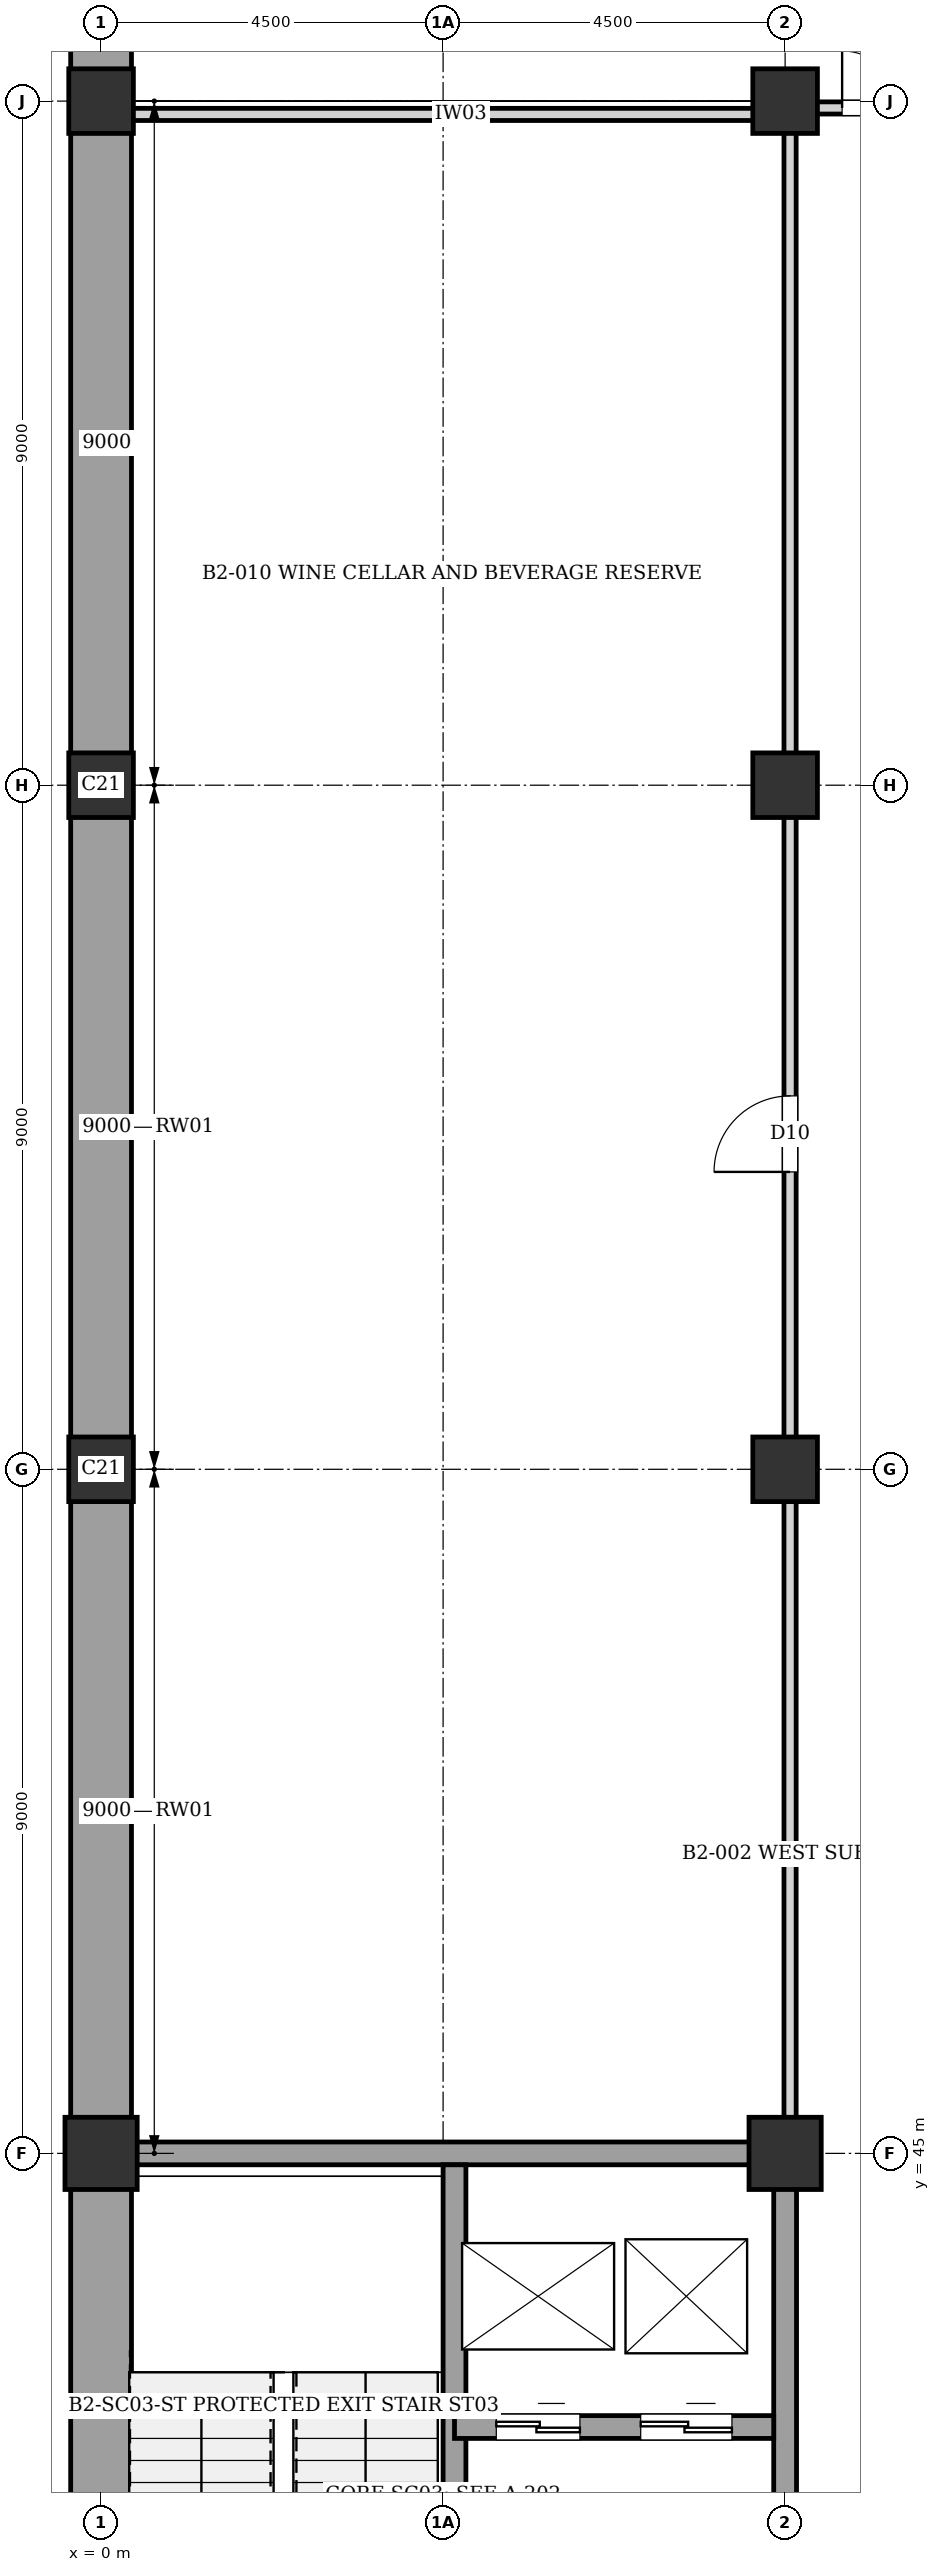
"""IFC4 building model, lengths in metres.
Left out: names, types, materials, properties, quantities, classifications, styles, units other than length and angle.
Written with IfcOpenShell. Run it as: python <this file> out.ifc"""

import sys

from ifc_helpers import new_model, si_unit, direction, frame, frame_2d, origin, origin_2d, place, context, subcontext, project, spatial, rectangle, extrude, element, fill, save


model = new_model("IFC4")
c1 = context("Model", 3, precision=1e-05, world=origin(), true_north=direction((0.0, 1.0)))
c2 = subcontext(c1, "Body", "Model", "MODEL_VIEW")
j1 = project(units=[si_unit("LENGTHUNIT", "METRE"), si_unit("PLANEANGLEUNIT", "RADIAN")], contexts=[c1])
p1 = place(None, origin())
s1 = spatial("IfcSite", under=j1, at=p1, CompositionType="ELEMENT")
p2 = place(p1, origin())
s2 = spatial("IfcBuilding", under=s1, at=p2, CompositionType="ELEMENT")
p3 = place(p2, frame((0.0, 0.0, -8.96)))
s3 = spatial("IfcBuildingStorey", under=s2, at=p3, CompositionType="ELEMENT", Elevation=-8.96)
p4 = place(p3, frame((0.0, 45.0, 0.0), z_axis=(0.0, 0.0, 1.0), x_axis=(1.0, 0.0, 0.0)))
e1 = element("IfcColumn", 1, at=p4, inside=s3, PredefinedType="COLUMN", context=c2, shape_type="SweptSolid", body=[
    extrude(rectangle(XDim=0.95, YDim=0.95, at=origin_2d()), origin(), (0.0, 0.0, 1.0), 4.48),
])
for number, where, z_axis, x_axis in (
    (2, (0.0, 54.0, 0.0), (0.0, 0.0, 1.0), (1.0, 0.0, 0.0)),
    (3, (0.0, 63.0, 0.0), (0.0, 0.0, 1.0), (1.0, 0.0, 0.0)),
    (4, (0.0, 72.0, 0.0), (0.0, 0.0, 1.0), (1.0, 0.0, 0.0)),
):
    element("IfcColumn", number, at=place(p3, frame(where, z_axis=z_axis, x_axis=x_axis)), inside=s3, PredefinedType="COLUMN", context=c2, shape_type="SweptSolid", body=[
        extrude(rectangle(XDim=0.85, YDim=0.85, at=origin_2d()), origin(), (0.0, 0.0, 1.0), 4.48),
    ])
p5 = place(p3, frame((9.0, 45.0, 0.0), z_axis=(0.0, 0.0, 1.0), x_axis=(1.0, 0.0, 0.0)))
e5 = element("IfcColumn", 5, at=p5, inside=s3, PredefinedType="COLUMN", context=c2, shape_type="SweptSolid", body=[
    extrude(rectangle(XDim=0.95, YDim=0.95, at=origin_2d()), origin(), (0.0, 0.0, 1.0), 4.48),
])
for number, where, z_axis, x_axis in (
    (6, (9.0, 54.0, 0.0), (0.0, 0.0, 1.0), (1.0, 0.0, 0.0)),
    (7, (9.0, 63.0, 0.0), (0.0, 0.0, 1.0), (1.0, 0.0, 0.0)),
    (8, (9.0, 72.0, 0.0), (0.0, 0.0, 1.0), (1.0, 0.0, 0.0)),
):
    element("IfcColumn", number, at=place(p3, frame(where, z_axis=z_axis, x_axis=x_axis)), inside=s3, PredefinedType="COLUMN", context=c2, shape_type="SweptSolid", body=[
        extrude(rectangle(XDim=0.85, YDim=0.85, at=origin_2d()), origin(), (0.0, 0.0, 1.0), 4.48),
    ])
for number, where, z_axis, x_axis in (
    (9, (0.0, 36.0, 0.0), (0.0, 0.0, 1.0), (0.0, 1.0, 0.0)),
    (10, (0.0, 45.0, 0.0), (0.0, 0.0, 1.0), (0.0, 1.0, 0.0)),
    (11, (0.0, 54.0, 0.0), (0.0, 0.0, 1.0), (0.0, 1.0, 0.0)),
    (12, (0.0, 63.0, 0.0), (0.0, 0.0, 1.0), (0.0, 1.0, 0.0)),
):
    element("IfcWall", number, at=place(p3, frame(where, z_axis=z_axis, x_axis=x_axis)), inside=s3, PredefinedType="USERDEFINED", context=c2, shape_type="SweptSolid", body=[
        extrude(rectangle(XDim=9.0, YDim=0.8, at=frame_2d((4.5, 0.0))), origin(), (0.0, 0.0, 1.0), 4.2),
    ])
p6 = place(p3, frame((0.0, 72.0, 0.0), z_axis=(0.0, 0.0, 1.0), x_axis=(0.0, 1.0, 0.0)))
e13 = element("IfcWall", 13, at=p6, inside=s3, PredefinedType="USERDEFINED", context=c2, shape_type="SweptSolid", body=[
    extrude(rectangle(XDim=9.0, YDim=0.8, at=frame_2d((4.5, 0.0))), origin(), (0.0, 0.0, 1.0), 4.03),
])
p7 = place(p3, frame((9.0, 36.0, 0.0), z_axis=(0.0, 0.0, 1.0), x_axis=(0.0, 1.0, 0.0)))
e14 = element("IfcWall", 14, at=p7, inside=s3, PredefinedType="SHEAR", context=c2, shape_type="SweptSolid", body=[
    extrude(rectangle(XDim=9.0, YDim=0.3, at=frame_2d((4.5, 0.0))), origin(), (0.0, 0.0, 1.0), 4.2),
])
p8 = place(p7, frame((1.95, 0.0, 0.0)))
e15 = element("IfcOpeningElement", 15, at=p8, cuts=e14, PredefinedType="OPENING", context=c2, shape_type="SweptSolid", body=[
    extrude(rectangle(XDim=1.6, YDim=2.1, at=frame_2d((0.8, 1.05))), frame((0.0, 0.16, 0.0), z_axis=(0.0, -1.0, 0.0), x_axis=(1.0, 0.0, 0.0)), (0.0, 0.0, 1.0), 0.32),
])
p9 = place(p3, frame((0.0, 45.0, 0.0), z_axis=(0.0, 0.0, 1.0), x_axis=(1.0, 0.0, 0.0)))
e16 = element("IfcWall", 16, at=p9, inside=s3, PredefinedType="SHEAR", context=c2, shape_type="SweptSolid", body=[
    extrude(rectangle(XDim=9.0, YDim=0.3, at=frame_2d((4.5, 0.0))), origin(), (0.0, 0.0, 1.0), 4.2),
])
p10 = place(p3, frame((4.65, 36.15, 0.0), z_axis=(0.0, 0.0, 1.0), x_axis=(0.0, 1.0, 0.0)))
e17 = element("IfcWall", 17, at=p10, inside=s3, PredefinedType="SHEAR", context=c2, shape_type="SweptSolid", body=[
    extrude(rectangle(XDim=8.7, YDim=0.3, at=frame_2d((4.35, 0.0))), origin(), (0.0, 0.0, 1.0), 4.2),
])
p11 = place(p10, frame((0.35, 0.0, 0.0)))
e18 = element("IfcOpeningElement", 18, at=p11, cuts=e17, PredefinedType="OPENING", context=c2, shape_type="SweptSolid", body=[
    extrude(rectangle(XDim=1.4, YDim=2.02, at=frame_2d((0.7, 1.01))), frame((0.0, 0.16, 0.0), z_axis=(0.0, -1.0, 0.0), x_axis=(1.0, 0.0, 0.0)), (0.0, 0.0, 1.0), 0.32),
])
p12 = place(p3, frame((4.65, 41.4, 0.0), z_axis=(0.0, 0.0, 1.0), x_axis=(1.0, 0.0, 0.0)))
e19 = element("IfcWall", 19, at=p12, inside=s3, PredefinedType="SHEAR", context=c2, shape_type="SweptSolid", body=[
    extrude(rectangle(XDim=4.2, YDim=0.3, at=frame_2d((2.1, 0.0))), origin(), (0.0, 0.0, 1.0), 4.2),
])
p13 = place(p12, frame((0.55, 0.0, 0.0)))
e20 = element("IfcOpeningElement", 20, at=p13, cuts=e19, PredefinedType="OPENING", context=c2, shape_type="SweptSolid", body=[
    extrude(rectangle(XDim=1.1, YDim=2.1, at=frame_2d((0.55, 1.05))), frame((0.0, 0.16, 0.0), z_axis=(0.0, -1.0, 0.0), x_axis=(1.0, 0.0, 0.0)), (0.0, 0.0, 1.0), 0.32),
])
p14 = place(p12, frame((2.45, 0.0, 0.0)))
e21 = element("IfcOpeningElement", 21, at=p14, cuts=e19, PredefinedType="OPENING", context=c2, shape_type="SweptSolid", body=[
    extrude(rectangle(XDim=1.2, YDim=2.2, at=frame_2d((0.6, 1.1))), frame((0.0, 0.16, 0.0), z_axis=(0.0, -1.0, 0.0), x_axis=(1.0, 0.0, 0.0)), (0.0, 0.0, 1.0), 0.32),
])
p15 = place(p3, frame((0.405, 71.825, 0.0), z_axis=(0.0, 0.0, 1.0), x_axis=(1.0, 0.0, 0.0)))
e22 = element("IfcWall", 22, at=p15, inside=s3, PredefinedType="PARTITIONING", context=c2, shape_type="SweptSolid", body=[
    extrude(rectangle(XDim=8.655, YDim=0.16, at=frame_2d((4.328, 0.0))), origin(), (0.0, 0.0, 1.0), 3.3),
])
p16 = place(p3, frame((9.065, 45.155, 0.0), z_axis=(0.0, 0.0, 1.0), x_axis=(0.0, 1.0, 0.0)))
e23 = element("IfcWall", 23, at=p16, inside=s3, PredefinedType="PARTITIONING", context=c2, shape_type="SweptSolid", body=[
    extrude(rectangle(XDim=26.515, YDim=0.16, at=frame_2d((13.257, 0.0))), origin(), (0.0, 0.0, 1.0), 3.3),
])
p17 = place(p16, frame((12.758, 0.0, 0.0)))
e24 = element("IfcOpeningElement", 24, at=p17, cuts=e23, PredefinedType="OPENING", context=c2, shape_type="SweptSolid", body=[
    extrude(rectangle(XDim=1.0, YDim=2.1, at=frame_2d((0.5, 1.05))), frame((0.0, 0.09, 0.0), z_axis=(0.0, -1.0, 0.0), x_axis=(1.0, 0.0, 0.0)), (0.0, 0.0, 1.0), 0.18),
])
p18 = place(p3, frame((9.22, 71.91, 0.0), z_axis=(0.0, 0.0, 1.0), x_axis=(1.0, 0.0, 0.0)))
e25 = element("IfcWall", 25, at=p18, inside=s3, PredefinedType="PARTITIONING", context=c2, shape_type="SweptSolid", body=[
    extrude(rectangle(XDim=2.56, YDim=0.16, at=frame_2d((1.28, 0.0))), origin(), (0.0, 0.0, 1.0), 3.3),
])
p19 = place(p18, frame((0.53, 0.0, 0.0)))
e26 = element("IfcOpeningElement", 26, at=p19, cuts=e25, PredefinedType="OPENING", context=c2, shape_type="SweptSolid", body=[
    extrude(rectangle(XDim=1.5, YDim=2.1, at=frame_2d((0.75, 1.05))), frame((0.0, 0.09, 0.0), z_axis=(0.0, -1.0, 0.0), x_axis=(1.0, 0.0, 0.0)), (0.0, 0.0, 1.0), 0.18),
])
p20 = place(p13, origin())
e27 = element("IfcDoor", 27, at=p20, inside=s3, OperationType="DOUBLE_DOOR_SLIDING", PredefinedType="DOOR", context=c2, shape_type="SweptSolid", body=[
    extrude(rectangle(XDim=1.1, YDim=2.1, at=frame_2d((0.55, 1.05))), frame((0.0, 0.025, 0.0), z_axis=(0.0, -1.0, 0.0), x_axis=(1.0, 0.0, 0.0)), (0.0, 0.0, 1.0), 0.05),
])
fill(e20, e27)
p21 = place(p14, origin())
e28 = element("IfcDoor", 28, at=p21, inside=s3, OperationType="DOUBLE_DOOR_SLIDING", PredefinedType="DOOR", context=c2, shape_type="SweptSolid", body=[
    extrude(rectangle(XDim=1.2, YDim=2.2, at=frame_2d((0.6, 1.1))), frame((0.0, 0.025, 0.0), z_axis=(0.0, -1.0, 0.0), x_axis=(1.0, 0.0, 0.0)), (0.0, 0.0, 1.0), 0.05),
])
fill(e21, e28)
p22 = place(p17, origin())
e29 = element("IfcDoor", 29, at=p22, inside=s3, OperationType="SINGLE_SWING_LEFT", PredefinedType="DOOR", context=c2, shape_type="SweptSolid", body=[
    extrude(rectangle(XDim=1.0, YDim=2.1, at=frame_2d((0.5, 1.05))), frame((0.0, 0.025, 0.0), z_axis=(0.0, -1.0, 0.0), x_axis=(1.0, 0.0, 0.0)), (0.0, 0.0, 1.0), 0.05),
])
fill(e24, e29)
p23 = place(p19, origin())
e30 = element("IfcDoor", 30, at=p23, inside=s3, OperationType="DOUBLE_DOOR_SINGLE_SWING", PredefinedType="DOOR", context=c2, shape_type="SweptSolid", body=[
    extrude(rectangle(XDim=1.5, YDim=2.1, at=frame_2d((0.75, 1.05))), frame((0.0, 0.025, 0.0), z_axis=(0.0, -1.0, 0.0), x_axis=(1.0, 0.0, 0.0)), (0.0, 0.0, 1.0), 0.05),
])
fill(e26, e30)
save(model, sys.argv[1])
